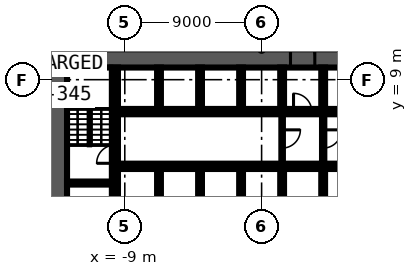
"""IFC4 building model, lengths in metres.
Left out: names, types, materials, properties, quantities, classifications, styles, units other than length and angle.
Written with IfcOpenShell. Run it as: python <this file> out.ifc"""

import sys

from ifc_helpers import new_model, si_unit, direction, frame, frame_2d, origin, place, context, subcontext, project, spatial, rectangle, extrude, element, fill, save


model = new_model("IFC4")
c1 = context("Model", 3, precision=1e-05, world=origin(), true_north=direction((0.0, 1.0)))
c2 = subcontext(c1, "Body", "Model", "MODEL_VIEW")
j1 = project(units=[si_unit("LENGTHUNIT", "METRE"), si_unit("PLANEANGLEUNIT", "RADIAN")], contexts=[c1])
p1 = place(None, origin())
s1 = spatial("IfcSite", under=j1, at=p1, CompositionType="ELEMENT")
p2 = place(p1, origin())
s2 = spatial("IfcBuilding", under=s1, at=p2, CompositionType="ELEMENT")
p3 = place(p2, frame((0.0, 0.0, -17.0)))
s3 = spatial("IfcBuildingStorey", under=s2, at=p3, CompositionType="ELEMENT", Elevation=-17.0)
p4 = place(p3, frame((-14.0, 10.4, 0.0), z_axis=(0.0, 0.0, 1.0), x_axis=(1.0, 0.0, 0.0)))
e1 = element("IfcWall", 1, at=p4, inside=s3, PredefinedType="SHEAR", context=c2, shape_type="SweptSolid", body=[
    extrude(rectangle(XDim=28.0, YDim=1.2, at=frame_2d((14.0, 0.0))), origin(), (0.0, 0.0, 1.0), 5.1),
])
p5 = place(p4, frame((15.9, 0.0, 0.0)))
e2 = element("IfcOpeningElement", 2, at=p5, cuts=e1, PredefinedType="OPENING", context=c2, shape_type="SweptSolid", body=[
    extrude(rectangle(XDim=1.6, YDim=2.1, at=frame_2d((0.8, 1.05))), frame((0.0, 0.61, 0.0), z_axis=(0.0, -1.0, 0.0), x_axis=(1.0, 0.0, 0.0)), (0.0, 0.0, 1.0), 1.22),
])
p6 = place(p3, frame((-13.4, -9.8, 0.0), z_axis=(0.0, 0.0, 1.0), x_axis=(0.0, 1.0, 0.0)))
e3 = element("IfcWall", 3, at=p6, inside=s3, PredefinedType="SHEAR", context=c2, shape_type="SweptSolid", body=[
    extrude(rectangle(XDim=19.6, YDim=1.2, at=frame_2d((9.8, 0.0))), origin(), (0.0, 0.0, 1.0), 5.1),
])
p7 = place(p3, frame((-9.65, -2.1, 0.0), z_axis=(0.0, 0.0, 1.0), x_axis=(0.0, 1.0, 0.0)))
e4 = element("IfcWall", 4, at=p7, inside=s3, PredefinedType="SHEAR", context=c2, shape_type="SweptSolid", body=[
    extrude(rectangle(XDim=4.2, YDim=0.4, at=frame_2d((2.1, 0.0))), origin(), (0.0, 0.0, 1.0), 5.1),
])
p8 = place(p3, frame((-9.65, 2.3, 0.0), z_axis=(0.0, 0.0, 1.0), x_axis=(0.0, 1.0, 0.0)))
e5 = element("IfcWall", 5, at=p8, inside=s3, PredefinedType="SHEAR", context=c2, shape_type="SweptSolid", body=[
    extrude(rectangle(XDim=7.5, YDim=0.4, at=frame_2d((3.75, 0.0))), origin(), (0.0, 0.0, 1.0), 5.1),
])
p9 = place(p8, frame((1.2, 0.0, 0.0)))
e6 = element("IfcOpeningElement", 6, at=p9, cuts=e5, PredefinedType="OPENING", context=c2, shape_type="SweptSolid", body=[
    extrude(rectangle(XDim=1.2, YDim=2.1, at=frame_2d((0.6, 1.05))), frame((0.0, 0.21, 0.0), z_axis=(0.0, -1.0, 0.0), x_axis=(1.0, 0.0, 0.0)), (0.0, 0.0, 1.0), 0.42),
])
p10 = place(p3, frame((-9.45, 2.2, 0.0), z_axis=(0.0, 0.0, 1.0), x_axis=(-1.0, 0.0, 0.0)))
e7 = element("IfcWall", 7, at=p10, inside=s3, PredefinedType="SHEAR", context=c2, shape_type="SweptSolid", body=[
    extrude(rectangle(XDim=3.35, YDim=0.2, at=frame_2d((1.675, 0.0))), origin(), (0.0, 0.0, 1.0), 5.1),
])
p11 = place(p3, frame((-9.45, 6.9, 0.0), z_axis=(0.0, 0.0, 1.0), x_axis=(1.0, 0.0, 0.0)))
e8 = element("IfcWall", 8, at=p11, inside=s3, PredefinedType="SHEAR", context=c2, shape_type="SweptSolid", body=[
    extrude(rectangle(XDim=18.9, YDim=0.35, at=frame_2d((9.45, 0.0))), origin(), (0.0, 0.0, 1.0), 5.1),
])
p12 = place(p11, frame((0.8, 0.0, 0.0)))
e9 = element("IfcOpeningElement", 9, at=p12, cuts=e8, PredefinedType="OPENING", context=c2, shape_type="SweptSolid", body=[
    extrude(rectangle(XDim=1.1, YDim=2.1, at=frame_2d((0.55, 1.05))), frame((0.0, 0.185, 0.0), z_axis=(0.0, -1.0, 0.0), x_axis=(1.0, 0.0, 0.0)), (0.0, 0.0, 1.0), 0.37),
])
p13 = place(p11, frame((3.5, 0.0, 0.0)))
e10 = element("IfcOpeningElement", 10, at=p13, cuts=e8, PredefinedType="OPENING", context=c2, shape_type="SweptSolid", body=[
    extrude(rectangle(XDim=1.1, YDim=2.1, at=frame_2d((0.55, 1.05))), frame((0.0, 0.185, 0.0), z_axis=(0.0, -1.0, 0.0), x_axis=(1.0, 0.0, 0.0)), (0.0, 0.0, 1.0), 0.37),
])
p14 = place(p11, frame((6.2, 0.0, 0.0)))
e11 = element("IfcOpeningElement", 11, at=p14, cuts=e8, PredefinedType="OPENING", context=c2, shape_type="SweptSolid", body=[
    extrude(rectangle(XDim=1.1, YDim=2.1, at=frame_2d((0.55, 1.05))), frame((0.0, 0.185, 0.0), z_axis=(0.0, -1.0, 0.0), x_axis=(1.0, 0.0, 0.0)), (0.0, 0.0, 1.0), 0.37),
])
p15 = place(p11, frame((8.9, 0.0, 0.0)))
e12 = element("IfcOpeningElement", 12, at=p15, cuts=e8, PredefinedType="OPENING", context=c2, shape_type="SweptSolid", body=[
    extrude(rectangle(XDim=1.1, YDim=2.1, at=frame_2d((0.55, 1.05))), frame((0.0, 0.185, 0.0), z_axis=(0.0, -1.0, 0.0), x_axis=(1.0, 0.0, 0.0)), (0.0, 0.0, 1.0), 0.37),
])
p16 = place(p11, frame((11.55, 0.0, 0.0)))
e13 = element("IfcOpeningElement", 13, at=p16, cuts=e8, PredefinedType="OPENING", context=c2, shape_type="SweptSolid", body=[
    extrude(rectangle(XDim=1.2, YDim=2.1, at=frame_2d((0.6, 1.05))), frame((0.0, 0.185, 0.0), z_axis=(0.0, -1.0, 0.0), x_axis=(1.0, 0.0, 0.0)), (0.0, 0.0, 1.0), 0.37),
])
p17 = place(p11, frame((14.3, 0.0, 0.0)))
e14 = element("IfcOpeningElement", 14, at=p17, cuts=e8, PredefinedType="OPENING", context=c2, shape_type="SweptSolid", body=[
    extrude(rectangle(XDim=1.1, YDim=2.1, at=frame_2d((0.55, 1.05))), frame((0.0, 0.185, 0.0), z_axis=(0.0, -1.0, 0.0), x_axis=(1.0, 0.0, 0.0)), (0.0, 0.0, 1.0), 0.37),
])
p18 = place(p11, frame((17.0, 0.0, 0.0)))
e15 = element("IfcOpeningElement", 15, at=p18, cuts=e8, PredefinedType="OPENING", context=c2, shape_type="SweptSolid", body=[
    extrude(rectangle(XDim=1.1, YDim=2.1, at=frame_2d((0.55, 1.05))), frame((0.0, 0.185, 0.0), z_axis=(0.0, -1.0, 0.0), x_axis=(1.0, 0.0, 0.0)), (0.0, 0.0, 1.0), 0.37),
])
p19 = place(p3, frame((9.45, 3.3, 0.0), z_axis=(0.0, 0.0, 1.0), x_axis=(-1.0, 0.0, 0.0)))
e16 = element("IfcWall", 16, at=p19, inside=s3, PredefinedType="SHEAR", context=c2, shape_type="SweptSolid", body=[
    extrude(rectangle(XDim=18.9, YDim=0.35, at=frame_2d((9.45, 0.0))), origin(), (0.0, 0.0, 1.0), 5.1),
])
p20 = place(p19, frame((6.2, 0.0, 0.0)))
e17 = element("IfcOpeningElement", 17, at=p20, cuts=e16, PredefinedType="OPENING", context=c2, shape_type="SweptSolid", body=[
    extrude(rectangle(XDim=1.1, YDim=2.1, at=frame_2d((0.55, 1.05))), frame((0.0, 0.185, 0.0), z_axis=(0.0, -1.0, 0.0), x_axis=(1.0, 0.0, 0.0)), (0.0, 0.0, 1.0), 0.37),
])
p21 = place(p19, frame((3.5, 0.0, 0.0)))
e18 = element("IfcOpeningElement", 18, at=p21, cuts=e16, PredefinedType="OPENING", context=c2, shape_type="SweptSolid", body=[
    extrude(rectangle(XDim=1.1, YDim=2.1, at=frame_2d((0.55, 1.05))), frame((0.0, 0.185, 0.0), z_axis=(0.0, -1.0, 0.0), x_axis=(1.0, 0.0, 0.0)), (0.0, 0.0, 1.0), 0.37),
])
p22 = place(p19, frame((0.9, 0.0, 0.0)))
e19 = element("IfcOpeningElement", 19, at=p22, cuts=e16, PredefinedType="OPENING", context=c2, shape_type="SweptSolid", body=[
    extrude(rectangle(XDim=0.9, YDim=2.1, at=frame_2d((0.45, 1.05))), frame((0.0, 0.185, 0.0), z_axis=(0.0, -1.0, 0.0), x_axis=(1.0, 0.0, 0.0)), (0.0, 0.0, 1.0), 0.37),
])
p23 = place(p3, frame((4.05, 6.725, 0.0), z_axis=(0.0, 0.0, 1.0), x_axis=(0.0, -1.0, 0.0)))
e20 = element("IfcWall", 20, at=p23, inside=s3, PredefinedType="PARTITIONING", context=c2, shape_type="SweptSolid", body=[
    extrude(rectangle(XDim=3.25, YDim=0.15, at=frame_2d((1.625, 0.0))), origin(), (0.0, 0.0, 1.0), 5.1),
])
p24 = place(p23, frame((1.025, 0.0, 0.0)))
e21 = element("IfcOpeningElement", 21, at=p24, cuts=e20, PredefinedType="OPENING", context=c2, shape_type="SweptSolid", body=[
    extrude(rectangle(XDim=1.2, YDim=2.1, at=frame_2d((0.6, 1.05))), frame((0.0, 0.085, 0.0), z_axis=(0.0, -1.0, 0.0), x_axis=(1.0, 0.0, 0.0)), (0.0, 0.0, 1.0), 0.17),
])
for number, where, z_axis, x_axis in (
    (22, (4.05, 0.4, 0.0), (0.0, 0.0, 1.0), (0.0, 1.0, 0.0)),
    (23, (4.05, 7.075, 0.0), (0.0, 0.0, 1.0), (0.0, 1.0, 0.0)),
):
    element("IfcWall", number, at=place(p3, frame(where, z_axis=z_axis, x_axis=x_axis)), inside=s3, PredefinedType="SOLIDWALL", context=c2, shape_type="SweptSolid", body=[
        extrude(rectangle(XDim=2.725, YDim=0.25, at=frame_2d((1.363, 0.0))), origin(), (0.0, 0.0, 1.0), 5.1),
    ])
p25 = place(p3, frame((1.35, 6.725, 0.0), z_axis=(0.0, 0.0, 1.0), x_axis=(0.0, -1.0, 0.0)))
e24 = element("IfcWall", 24, at=p25, inside=s3, PredefinedType="PARTITIONING", context=c2, shape_type="SweptSolid", body=[
    extrude(rectangle(XDim=3.25, YDim=0.1, at=frame_2d((1.625, 0.0))), origin(), (0.0, 0.0, 1.0), 5.1),
])
p26 = place(p25, frame((1.025, 0.0, 0.0)))
e25 = element("IfcOpeningElement", 25, at=p26, cuts=e24, PredefinedType="OPENING", context=c2, shape_type="SweptSolid", body=[
    extrude(rectangle(XDim=1.2, YDim=2.1, at=frame_2d((0.6, 1.05))), frame((0.0, 0.06, 0.0), z_axis=(0.0, -1.0, 0.0), x_axis=(1.0, 0.0, 0.0)), (0.0, 0.0, 1.0), 0.12),
])
p27 = place(p3, frame((1.35, 0.4, 0.0), z_axis=(0.0, 0.0, 1.0), x_axis=(0.0, 1.0, 0.0)))
e26 = element("IfcWall", 26, at=p27, inside=s3, PredefinedType="SHEAR", context=c2, shape_type="SweptSolid", body=[
    extrude(rectangle(XDim=2.725, YDim=0.25, at=frame_2d((1.363, 0.0))), origin(), (0.0, 0.0, 1.0), 5.1),
])
p28 = place(p3, frame((1.35, 7.075, 0.0), z_axis=(0.0, 0.0, 1.0), x_axis=(0.0, 1.0, 0.0)))
e27 = element("IfcWall", 27, at=p28, inside=s3, PredefinedType="SOLIDWALL", context=c2, shape_type="SweptSolid", body=[
    extrude(rectangle(XDim=2.725, YDim=0.25, at=frame_2d((1.363, 0.0))), origin(), (0.0, 0.0, 1.0), 5.1),
])
p29 = place(p3, frame((-1.35, 0.4, 0.0), z_axis=(0.0, 0.0, 1.0), x_axis=(0.0, 1.0, 0.0)))
e28 = element("IfcWall", 28, at=p29, inside=s3, PredefinedType="SHEAR", context=c2, shape_type="SweptSolid", body=[
    extrude(rectangle(XDim=2.725, YDim=0.25, at=frame_2d((1.363, 0.0))), origin(), (0.0, 0.0, 1.0), 5.1),
])
p30 = place(p3, frame((-1.35, 7.075, 0.0), z_axis=(0.0, 0.0, 1.0), x_axis=(0.0, 1.0, 0.0)))
e29 = element("IfcWall", 29, at=p30, inside=s3, PredefinedType="SOLIDWALL", context=c2, shape_type="SweptSolid", body=[
    extrude(rectangle(XDim=2.725, YDim=0.25, at=frame_2d((1.363, 0.0))), origin(), (0.0, 0.0, 1.0), 5.1),
])
p31 = place(p3, frame((-4.05, 0.4, 0.0), z_axis=(0.0, 0.0, 1.0), x_axis=(0.0, 1.0, 0.0)))
e30 = element("IfcWall", 30, at=p31, inside=s3, PredefinedType="SHEAR", context=c2, shape_type="SweptSolid", body=[
    extrude(rectangle(XDim=2.725, YDim=0.25, at=frame_2d((1.363, 0.0))), origin(), (0.0, 0.0, 1.0), 5.1),
])
p32 = place(p3, frame((-4.05, 7.075, 0.0), z_axis=(0.0, 0.0, 1.0), x_axis=(0.0, 1.0, 0.0)))
e31 = element("IfcWall", 31, at=p32, inside=s3, PredefinedType="SOLIDWALL", context=c2, shape_type="SweptSolid", body=[
    extrude(rectangle(XDim=2.725, YDim=0.25, at=frame_2d((1.363, 0.0))), origin(), (0.0, 0.0, 1.0), 5.1),
])
p33 = place(p3, frame((-6.75, 0.4, 0.0), z_axis=(0.0, 0.0, 1.0), x_axis=(0.0, 1.0, 0.0)))
e32 = element("IfcWall", 32, at=p33, inside=s3, PredefinedType="SHEAR", context=c2, shape_type="SweptSolid", body=[
    extrude(rectangle(XDim=2.725, YDim=0.25, at=frame_2d((1.363, 0.0))), origin(), (0.0, 0.0, 1.0), 5.1),
])
p34 = place(p3, frame((-6.75, 7.075, 0.0), z_axis=(0.0, 0.0, 1.0), x_axis=(0.0, 1.0, 0.0)))
e33 = element("IfcWall", 33, at=p34, inside=s3, PredefinedType="SOLIDWALL", context=c2, shape_type="SweptSolid", body=[
    extrude(rectangle(XDim=2.725, YDim=0.25, at=frame_2d((1.363, 0.0))), origin(), (0.0, 0.0, 1.0), 5.1),
])
p35 = place(p12, origin())
e34 = element("IfcDoor", 34, at=p35, inside=s3, OperationType="DOUBLE_DOOR_SLIDING", PredefinedType="DOOR", context=c2, shape_type="SweptSolid", body=[
    extrude(rectangle(XDim=1.1, YDim=2.1, at=frame_2d((0.55, 1.05))), frame((0.0, 0.025, 0.0), z_axis=(0.0, -1.0, 0.0), x_axis=(1.0, 0.0, 0.0)), (0.0, 0.0, 1.0), 0.05),
])
fill(e9, e34)
p36 = place(p13, origin())
e35 = element("IfcDoor", 35, at=p36, inside=s3, OperationType="DOUBLE_DOOR_SLIDING", PredefinedType="DOOR", context=c2, shape_type="SweptSolid", body=[
    extrude(rectangle(XDim=1.1, YDim=2.1, at=frame_2d((0.55, 1.05))), frame((0.0, 0.025, 0.0), z_axis=(0.0, -1.0, 0.0), x_axis=(1.0, 0.0, 0.0)), (0.0, 0.0, 1.0), 0.05),
])
fill(e10, e35)
p37 = place(p14, origin())
e36 = element("IfcDoor", 36, at=p37, inside=s3, OperationType="DOUBLE_DOOR_SLIDING", PredefinedType="DOOR", context=c2, shape_type="SweptSolid", body=[
    extrude(rectangle(XDim=1.1, YDim=2.1, at=frame_2d((0.55, 1.05))), frame((0.0, 0.025, 0.0), z_axis=(0.0, -1.0, 0.0), x_axis=(1.0, 0.0, 0.0)), (0.0, 0.0, 1.0), 0.05),
])
fill(e11, e36)
p38 = place(p15, origin())
e37 = element("IfcDoor", 37, at=p38, inside=s3, OperationType="DOUBLE_DOOR_SLIDING", PredefinedType="DOOR", context=c2, shape_type="SweptSolid", body=[
    extrude(rectangle(XDim=1.1, YDim=2.1, at=frame_2d((0.55, 1.05))), frame((0.0, 0.025, 0.0), z_axis=(0.0, -1.0, 0.0), x_axis=(1.0, 0.0, 0.0)), (0.0, 0.0, 1.0), 0.05),
])
fill(e12, e37)
p39 = place(p5, origin())
e38 = element("IfcDoor", 38, at=p39, inside=s3, OperationType="DOUBLE_DOOR_SINGLE_SWING", PredefinedType="DOOR", context=c2, shape_type="SweptSolid", body=[
    extrude(rectangle(XDim=1.6, YDim=2.1, at=frame_2d((0.8, 1.05))), frame((0.0, 0.025, 0.0), z_axis=(0.0, -1.0, 0.0), x_axis=(1.0, 0.0, 0.0)), (0.0, 0.0, 1.0), 0.05),
])
fill(e2, e38)
p40 = place(p16, origin())
e39 = element("IfcDoor", 39, at=p40, inside=s3, OperationType="SINGLE_SWING_LEFT", PredefinedType="DOOR", context=c2, shape_type="SweptSolid", body=[
    extrude(rectangle(XDim=1.2, YDim=2.1, at=frame_2d((0.6, 1.05))), frame((0.0, 0.025, 0.0), z_axis=(0.0, -1.0, 0.0), x_axis=(1.0, 0.0, 0.0)), (0.0, 0.0, 1.0), 0.05),
])
fill(e13, e39)
p41 = place(p17, origin())
e40 = element("IfcDoor", 40, at=p41, inside=s3, OperationType="DOUBLE_DOOR_SLIDING", PredefinedType="DOOR", context=c2, shape_type="SweptSolid", body=[
    extrude(rectangle(XDim=1.1, YDim=2.1, at=frame_2d((0.55, 1.05))), frame((0.0, 0.025, 0.0), z_axis=(0.0, -1.0, 0.0), x_axis=(1.0, 0.0, 0.0)), (0.0, 0.0, 1.0), 0.05),
])
fill(e14, e40)
p42 = place(p20, origin())
e41 = element("IfcDoor", 41, at=p42, inside=s3, OperationType="DOUBLE_DOOR_SLIDING", PredefinedType="DOOR", context=c2, shape_type="SweptSolid", body=[
    extrude(rectangle(XDim=1.1, YDim=2.1, at=frame_2d((0.55, 1.05))), frame((0.0, 0.025, 0.0), z_axis=(0.0, -1.0, 0.0), x_axis=(1.0, 0.0, 0.0)), (0.0, 0.0, 1.0), 0.05),
])
fill(e17, e41)
p43 = place(p21, origin())
e42 = element("IfcDoor", 42, at=p43, inside=s3, OperationType="DOUBLE_DOOR_SLIDING", PredefinedType="DOOR", context=c2, shape_type="SweptSolid", body=[
    extrude(rectangle(XDim=1.1, YDim=2.1, at=frame_2d((0.55, 1.05))), frame((0.0, 0.025, 0.0), z_axis=(0.0, -1.0, 0.0), x_axis=(1.0, 0.0, 0.0)), (0.0, 0.0, 1.0), 0.05),
])
fill(e18, e42)
p44 = place(p9, origin())
e43 = element("IfcDoor", 43, at=p44, inside=s3, OperationType="SINGLE_SWING_RIGHT", PredefinedType="DOOR", context=c2, shape_type="SweptSolid", body=[
    extrude(rectangle(XDim=1.2, YDim=2.1, at=frame_2d((0.6, 1.05))), frame((0.0, 0.025, 0.0), z_axis=(0.0, -1.0, 0.0), x_axis=(1.0, 0.0, 0.0)), (0.0, 0.0, 1.0), 0.05),
])
fill(e6, e43)
p45 = place(p26, origin())
e44 = element("IfcDoor", 44, at=p45, inside=s3, OperationType="SINGLE_SWING_LEFT", PredefinedType="DOOR", context=c2, shape_type="SweptSolid", body=[
    extrude(rectangle(XDim=1.2, YDim=2.1, at=frame_2d((0.6, 1.05))), frame((0.0, 0.025, 0.0), z_axis=(0.0, -1.0, 0.0), x_axis=(1.0, 0.0, 0.0)), (0.0, 0.0, 1.0), 0.05),
])
fill(e25, e44)
p46 = place(p24, origin())
e45 = element("IfcDoor", 45, at=p46, inside=s3, OperationType="SINGLE_SWING_RIGHT", PredefinedType="DOOR", context=c2, shape_type="SweptSolid", body=[
    extrude(rectangle(XDim=1.2, YDim=2.1, at=frame_2d((0.6, 1.05))), frame((0.0, 0.025, 0.0), z_axis=(0.0, -1.0, 0.0), x_axis=(1.0, 0.0, 0.0)), (0.0, 0.0, 1.0), 0.05),
])
fill(e21, e45)
save(model, sys.argv[1])
